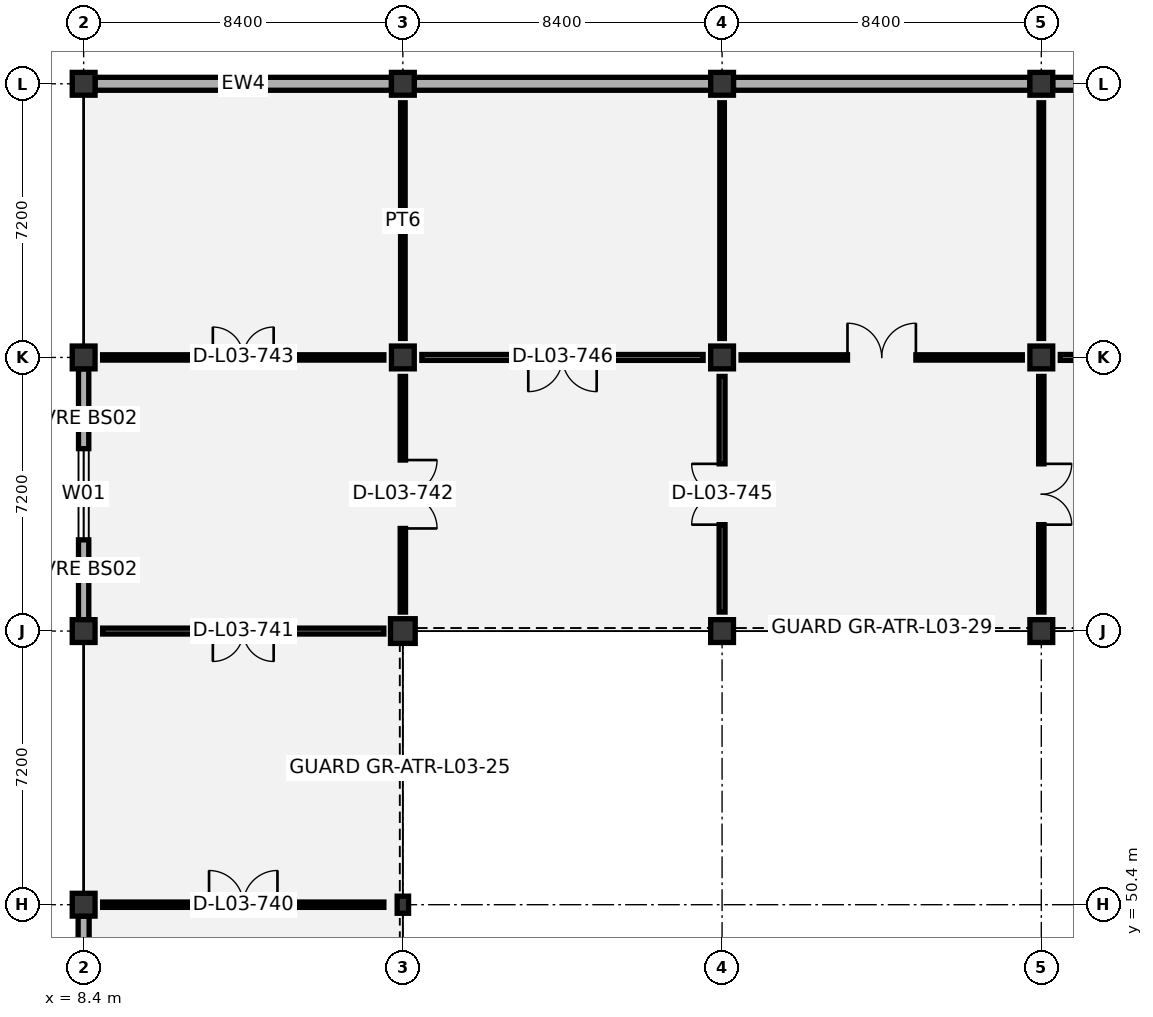
"""IFC4 building model, lengths in metres.
Left out: names, types, materials, properties, quantities, classifications, styles, units other than length and angle.
Written with IfcOpenShell. Run it as: python <this file> out.ifc"""

import sys

from ifc_helpers import new_model, si_unit, direction, frame, frame_2d, origin, origin_2d, place, context, subcontext, project, spatial, rectangle, i_section, extrude, element, fill, save


model = new_model("IFC4")
c1 = context("Model", 3, precision=1e-05, world=origin(), true_north=direction((0.0, 1.0)))
c2 = subcontext(c1, "Body", "Model", "MODEL_VIEW")
j1 = project(units=[si_unit("LENGTHUNIT", "METRE"), si_unit("PLANEANGLEUNIT", "RADIAN")], contexts=[c1])
p1 = place(None, origin())
s1 = spatial("IfcSite", under=j1, at=p1, CompositionType="ELEMENT")
p2 = place(p1, origin())
s2 = spatial("IfcBuilding", under=s1, at=p2, CompositionType="ELEMENT")
p3 = place(p2, frame((0.0, 0.0, 16.8)))
s3 = spatial("IfcBuildingStorey", under=s2, at=p3, CompositionType="ELEMENT", Elevation=16.8)
for number, where, z_axis, x_axis in (
    (1, (8.4, 50.4, 0.0), (0.0, 0.0, 1.0), (1.0, 0.0, 0.0)),
    (2, (8.4, 57.6, 0.0), (0.0, 0.0, 1.0), (1.0, 0.0, 0.0)),
    (3, (8.4, 64.8, 0.0), (0.0, 0.0, 1.0), (1.0, 0.0, 0.0)),
    (4, (8.4, 72.0, 0.0), (0.0, 0.0, 1.0), (1.0, 0.0, 0.0)),
):
    element("IfcColumn", number, at=place(p3, frame(where, z_axis=z_axis, x_axis=x_axis)), inside=s3, PredefinedType="COLUMN", context=c2, shape_type="SweptSolid", body=[
        extrude(rectangle(XDim=0.6, YDim=0.6, at=origin_2d()), origin(), (0.0, 0.0, 1.0), 5.05),
    ])
p4 = place(p3, frame((16.8, 50.4, 0.0), z_axis=(0.0, 0.0, 1.0), x_axis=(1.0, 0.0, 0.0)))
e5 = element("IfcColumn", 5, at=p4, inside=s3, PredefinedType="COLUMN", context=c2, shape_type="SweptSolid", body=[
    extrude(i_section(OverallWidth=0.3, OverallDepth=0.45, WebThickness=0.014, FlangeThickness=0.026, FilletRadius=0.027, at=origin_2d()), origin(), (0.0, 0.0, 1.0), 5.4),
])
p5 = place(p3, frame((16.8, 57.6, 0.0), z_axis=(0.0, 0.0, 1.0), x_axis=(1.0, 0.0, 0.0)))
e6 = element("IfcColumn", 6, at=p5, inside=s3, PredefinedType="COLUMN", context=c2, shape_type="SweptSolid", body=[
    extrude(rectangle(XDim=0.65, YDim=0.65, at=origin_2d()), origin(), (0.0, 0.0, 1.0), 5.4),
])
for number, where, z_axis, x_axis in (
    (7, (16.8, 64.8, 0.0), (0.0, 0.0, 1.0), (1.0, 0.0, 0.0)),
    (8, (16.8, 72.0, 0.0), (0.0, 0.0, 1.0), (1.0, 0.0, 0.0)),
    (9, (25.2, 57.6, 0.0), (0.0, 0.0, 1.0), (1.0, 0.0, 0.0)),
    (10, (25.2, 64.8, 0.0), (0.0, 0.0, 1.0), (1.0, 0.0, 0.0)),
    (11, (25.2, 72.0, 0.0), (0.0, 0.0, 1.0), (1.0, 0.0, 0.0)),
    (12, (33.6, 57.6, 0.0), (0.0, 0.0, 1.0), (1.0, 0.0, 0.0)),
    (13, (33.6, 64.8, 0.0), (0.0, 0.0, 1.0), (1.0, 0.0, 0.0)),
    (14, (33.6, 72.0, 0.0), (0.0, 0.0, 1.0), (1.0, 0.0, 0.0)),
):
    element("IfcColumn", number, at=place(p3, frame(where, z_axis=z_axis, x_axis=x_axis)), inside=s3, PredefinedType="COLUMN", context=c2, shape_type="SweptSolid", body=[
        extrude(rectangle(XDim=0.6, YDim=0.6, at=origin_2d()), origin(), (0.0, 0.0, 1.0), 5.05),
    ])
p6 = place(p3, frame((8.4, 43.5, 0.0), z_axis=(0.0, 0.0, 1.0), x_axis=(0.0, 1.0, 0.0)))
e15 = element("IfcWall", 15, at=p6, inside=s3, PredefinedType="SOLIDWALL", context=c2, shape_type="SweptSolid", body=[
    extrude(rectangle(XDim=6.6, YDim=0.29, at=frame_2d((3.3, 0.0))), origin(), (0.0, 0.0, 1.0), 4.17),
])
p7 = place(p6, frame((2.175, 0.0, 0.9)))
e16 = element("IfcOpeningElement", 16, at=p7, cuts=e15, PredefinedType="OPENING", context=c2, shape_type="SweptSolid", body=[
    extrude(rectangle(XDim=2.25, YDim=1.95, at=frame_2d((1.125, 0.975))), frame((0.0, 0.155, 0.0), z_axis=(0.0, -1.0, 0.0), x_axis=(1.0, 0.0, 0.0)), (0.0, 0.0, 1.0), 0.31),
])
p8 = place(p3, frame((8.4, 57.9, 0.0), z_axis=(0.0, 0.0, 1.0), x_axis=(0.0, 1.0, 0.0)))
e17 = element("IfcWall", 17, at=p8, inside=s3, PredefinedType="SOLIDWALL", context=c2, shape_type="SweptSolid", body=[
    extrude(rectangle(XDim=6.6, YDim=0.27, at=frame_2d((3.3, 0.0))), origin(), (0.0, 0.0, 1.0), 4.17),
])
p9 = place(p8, frame((2.1, 0.0, 0.9)))
e18 = element("IfcOpeningElement", 18, at=p9, cuts=e17, PredefinedType="OPENING", context=c2, shape_type="SweptSolid", body=[
    extrude(rectangle(XDim=2.4, YDim=1.8, at=frame_2d((1.2, 0.9))), frame((0.0, 0.145, 0.0), z_axis=(0.0, -1.0, 0.0), x_axis=(1.0, 0.0, 0.0)), (0.0, 0.0, 1.0), 0.29),
])
p10 = place(p3, frame((8.7, 72.0, 0.0), z_axis=(0.0, 0.0, 1.0), x_axis=(1.0, 0.0, 0.0)))
e19 = element("IfcWall", 19, at=p10, inside=s3, PredefinedType="SOLIDWALL", context=c2, shape_type="SweptSolid", body=[
    extrude(rectangle(XDim=7.8, YDim=0.34, at=frame_2d((3.9, 0.0))), origin(), (0.0, 0.0, 1.0), 4.17),
])
p11 = place(p3, frame((17.1, 72.0, 0.0), z_axis=(0.0, 0.0, 1.0), x_axis=(1.0, 0.0, 0.0)))
e20 = element("IfcWall", 20, at=p11, inside=s3, PredefinedType="SOLIDWALL", context=c2, shape_type="SweptSolid", body=[
    extrude(rectangle(XDim=7.8, YDim=0.34, at=frame_2d((3.9, 0.0))), origin(), (0.0, 0.0, 1.0), 4.17),
])
for number, where, z_axis, x_axis in (
    (21, (25.5, 72.0, 0.0), (0.0, 0.0, 1.0), (1.0, 0.0, 0.0)),
    (22, (33.9, 72.0, 0.0), (0.0, 0.0, 1.0), (1.0, 0.0, 0.0)),
):
    element("IfcWall", number, at=place(p3, frame(where, z_axis=z_axis, x_axis=x_axis)), inside=s3, PredefinedType="SOLIDWALL", context=c2, shape_type="SweptSolid", body=[
        extrude(rectangle(XDim=7.8, YDim=0.34, at=frame_2d((3.9, 0.0))), origin(), (0.0, 0.0, 1.0), 4.17),
    ])
p12 = place(p3, frame((8.9, 50.4, 0.0), z_axis=(0.0, 0.0, 1.0), x_axis=(1.0, 0.0, 0.0)))
e23 = element("IfcWall", 23, at=p12, inside=s3, PredefinedType="PARTITIONING", context=c2, shape_type="SweptSolid", body=[
    extrude(rectangle(XDim=7.4, YDim=0.14, at=frame_2d((3.7, 0.0))), origin(), (0.0, 0.0, 1.0), 4.07),
])
p13 = place(p12, frame((2.8, 0.0, 0.0)))
e24 = element("IfcOpeningElement", 24, at=p13, cuts=e23, PredefinedType="OPENING", context=c2, shape_type="SweptSolid", body=[
    extrude(rectangle(XDim=1.8, YDim=2.25, at=frame_2d((0.9, 1.125))), frame((0.0, 0.08, 0.0), z_axis=(0.0, -1.0, 0.0), x_axis=(1.0, 0.0, 0.0)), (0.0, 0.0, 1.0), 0.16),
])
p14 = place(p3, frame((8.9, 57.6, 0.0), z_axis=(0.0, 0.0, 1.0), x_axis=(1.0, 0.0, 0.0)))
e25 = element("IfcWall", 25, at=p14, inside=s3, PredefinedType="PARTITIONING", context=c2, shape_type="SweptSolid", body=[
    extrude(rectangle(XDim=7.4, YDim=0.155, at=frame_2d((3.7, 0.0))), origin(), (0.0, 0.0, 1.0), 4.07),
])
p15 = place(p14, frame((2.9, 0.0, 0.0)))
e26 = element("IfcOpeningElement", 26, at=p15, cuts=e25, PredefinedType="OPENING", context=c2, shape_type="SweptSolid", body=[
    extrude(rectangle(XDim=1.6, YDim=2.2, at=frame_2d((0.8, 1.1))), frame((0.0, 0.087, 0.0), z_axis=(0.0, -1.0, 0.0), x_axis=(1.0, 0.0, 0.0)), (0.0, 0.0, 1.0), 0.175),
])
p16 = place(p3, frame((16.8, 58.1, 0.0), z_axis=(0.0, 0.0, 1.0), x_axis=(0.0, 1.0, 0.0)))
e27 = element("IfcWall", 27, at=p16, inside=s3, PredefinedType="PARTITIONING", context=c2, shape_type="SweptSolid", body=[
    extrude(rectangle(XDim=6.2, YDim=0.14, at=frame_2d((3.1, 0.0))), origin(), (0.0, 0.0, 1.0), 4.12),
])
p17 = place(p16, frame((2.2, 0.0, 0.0)))
e28 = element("IfcOpeningElement", 28, at=p17, cuts=e27, PredefinedType="OPENING", context=c2, shape_type="SweptSolid", body=[
    extrude(rectangle(XDim=1.8, YDim=2.25, at=frame_2d((0.9, 1.125))), frame((0.0, 0.08, 0.0), z_axis=(0.0, -1.0, 0.0), x_axis=(1.0, 0.0, 0.0)), (0.0, 0.0, 1.0), 0.16),
])
p18 = place(p3, frame((8.9, 64.8, 0.0), z_axis=(0.0, 0.0, 1.0), x_axis=(1.0, 0.0, 0.0)))
e29 = element("IfcWall", 29, at=p18, inside=s3, PredefinedType="PARTITIONING", context=c2, shape_type="SweptSolid", body=[
    extrude(rectangle(XDim=7.4, YDim=0.14, at=frame_2d((3.7, 0.0))), origin(), (0.0, 0.0, 1.0), 4.07),
])
p19 = place(p18, frame((2.9, 0.0, 0.0)))
e30 = element("IfcOpeningElement", 30, at=p19, cuts=e29, PredefinedType="OPENING", context=c2, shape_type="SweptSolid", body=[
    extrude(rectangle(XDim=1.6, YDim=2.2, at=frame_2d((0.8, 1.1))), frame((0.0, 0.08, 0.0), z_axis=(0.0, -1.0, 0.0), x_axis=(1.0, 0.0, 0.0)), (0.0, 0.0, 1.0), 0.16),
])
p20 = place(p3, frame((16.8, 65.3, 0.0), z_axis=(0.0, 0.0, 1.0), x_axis=(0.0, 1.0, 0.0)))
e31 = element("IfcWall", 31, at=p20, inside=s3, PredefinedType="PARTITIONING", context=c2, shape_type="SweptSolid", body=[
    extrude(rectangle(XDim=6.2, YDim=0.12, at=frame_2d((3.1, 0.0))), origin(), (0.0, 0.0, 1.0), 4.53),
])
p21 = place(p3, frame((25.2, 58.1, 0.0), z_axis=(0.0, 0.0, 1.0), x_axis=(0.0, 1.0, 0.0)))
e32 = element("IfcWall", 32, at=p21, inside=s3, PredefinedType="PARTITIONING", context=c2, shape_type="SweptSolid", body=[
    extrude(rectangle(XDim=6.2, YDim=0.155, at=frame_2d((3.1, 0.0))), origin(), (0.0, 0.0, 1.0), 4.53),
])
p22 = place(p21, frame((2.3, 0.0, 0.0)))
e33 = element("IfcOpeningElement", 33, at=p22, cuts=e32, PredefinedType="OPENING", context=c2, shape_type="SweptSolid", body=[
    extrude(rectangle(XDim=1.6, YDim=2.2, at=frame_2d((0.8, 1.1))), frame((0.0, 0.087, 0.0), z_axis=(0.0, -1.0, 0.0), x_axis=(1.0, 0.0, 0.0)), (0.0, 0.0, 1.0), 0.175),
])
p23 = place(p3, frame((17.3, 64.8, 0.0), z_axis=(0.0, 0.0, 1.0), x_axis=(1.0, 0.0, 0.0)))
e34 = element("IfcWall", 34, at=p23, inside=s3, PredefinedType="PARTITIONING", context=c2, shape_type="SweptSolid", body=[
    extrude(rectangle(XDim=7.4, YDim=0.155, at=frame_2d((3.7, 0.0))), origin(), (0.0, 0.0, 1.0), 4.07),
])
p24 = place(p23, frame((2.8, 0.0, 0.0)))
e35 = element("IfcOpeningElement", 35, at=p24, cuts=e34, PredefinedType="OPENING", context=c2, shape_type="SweptSolid", body=[
    extrude(rectangle(XDim=1.8, YDim=2.25, at=frame_2d((0.9, 1.125))), frame((0.0, 0.087, 0.0), z_axis=(0.0, -1.0, 0.0), x_axis=(1.0, 0.0, 0.0)), (0.0, 0.0, 1.0), 0.175),
])
p25 = place(p3, frame((25.2, 65.3, 0.0), z_axis=(0.0, 0.0, 1.0), x_axis=(0.0, 1.0, 0.0)))
e36 = element("IfcWall", 36, at=p25, inside=s3, PredefinedType="PARTITIONING", context=c2, shape_type="SweptSolid", body=[
    extrude(rectangle(XDim=6.2, YDim=0.12, at=frame_2d((3.1, 0.0))), origin(), (0.0, 0.0, 1.0), 4.12),
])
p26 = place(p3, frame((33.6, 58.1, 0.0), z_axis=(0.0, 0.0, 1.0), x_axis=(0.0, 1.0, 0.0)))
e37 = element("IfcWall", 37, at=p26, inside=s3, PredefinedType="PARTITIONING", context=c2, shape_type="SweptSolid", body=[
    extrude(rectangle(XDim=6.2, YDim=0.14, at=frame_2d((3.1, 0.0))), origin(), (0.0, 0.0, 1.0), 4.12),
])
p27 = place(p26, frame((2.3, 0.0, 0.0)))
e38 = element("IfcOpeningElement", 38, at=p27, cuts=e37, PredefinedType="OPENING", context=c2, shape_type="SweptSolid", body=[
    extrude(rectangle(XDim=1.6, YDim=2.2, at=frame_2d((0.8, 1.1))), frame((0.0, 0.08, 0.0), z_axis=(0.0, -1.0, 0.0), x_axis=(1.0, 0.0, 0.0)), (0.0, 0.0, 1.0), 0.16),
])
p28 = place(p3, frame((25.7, 64.8, 0.0), z_axis=(0.0, 0.0, 1.0), x_axis=(1.0, 0.0, 0.0)))
e39 = element("IfcWall", 39, at=p28, inside=s3, PredefinedType="PARTITIONING", context=c2, shape_type="SweptSolid", body=[
    extrude(rectangle(XDim=7.4, YDim=0.14, at=frame_2d((3.7, 0.0))), origin(), (0.0, 0.0, 1.0), 4.07),
])
p29 = place(p28, frame((2.8, 0.0, 0.0)))
e40 = element("IfcOpeningElement", 40, at=p29, cuts=e39, PredefinedType="OPENING", context=c2, shape_type="SweptSolid", body=[
    extrude(rectangle(XDim=1.8, YDim=2.25, at=frame_2d((0.9, 1.125))), frame((0.0, 0.08, 0.0), z_axis=(0.0, -1.0, 0.0), x_axis=(1.0, 0.0, 0.0)), (0.0, 0.0, 1.0), 0.16),
])
p30 = place(p3, frame((33.6, 65.3, 0.0), z_axis=(0.0, 0.0, 1.0), x_axis=(0.0, 1.0, 0.0)))
e41 = element("IfcWall", 41, at=p30, inside=s3, PredefinedType="PARTITIONING", context=c2, shape_type="SweptSolid", body=[
    extrude(rectangle(XDim=6.2, YDim=0.12, at=frame_2d((3.1, 0.0))), origin(), (0.0, 0.0, 1.0), 4.32),
])
p31 = place(p3, frame((34.1, 64.8, 0.0), z_axis=(0.0, 0.0, 1.0), x_axis=(1.0, 0.0, 0.0)))
e42 = element("IfcWall", 42, at=p31, inside=s3, PredefinedType="PARTITIONING", context=c2, shape_type="SweptSolid", body=[
    extrude(rectangle(XDim=7.4, YDim=0.155, at=frame_2d((3.7, 0.0))), origin(), (0.0, 0.0, 1.0), 4.07),
])
p32 = place(p31, frame((2.9, 0.0, 0.0)))
e43 = element("IfcOpeningElement", 43, at=p32, cuts=e42, PredefinedType="OPENING", context=c2, shape_type="SweptSolid", body=[
    extrude(rectangle(XDim=1.6, YDim=2.2, at=frame_2d((0.8, 1.1))), frame((0.0, 0.087, 0.0), z_axis=(0.0, -1.0, 0.0), x_axis=(1.0, 0.0, 0.0)), (0.0, 0.0, 1.0), 0.175),
])
p33 = place(p9, origin())
e44 = element("IfcWindow", 44, at=p33, inside=s3, PartitioningType="SINGLE_PANEL", PredefinedType="WINDOW", context=c2, shape_type="SweptSolid", body=[
    extrude(rectangle(XDim=2.4, YDim=1.8, at=frame_2d((1.2, 0.9))), frame((0.0, 0.03, 0.0), z_axis=(0.0, -1.0, 0.0), x_axis=(1.0, 0.0, 0.0)), (0.0, 0.0, 1.0), 0.06),
])
fill(e18, e44)
p34 = place(p13, origin())
e45 = element("IfcDoor", 45, at=p34, inside=s3, OperationType="DOUBLE_DOOR_SINGLE_SWING", PredefinedType="DOOR", context=c2, shape_type="SweptSolid", body=[
    extrude(rectangle(XDim=1.8, YDim=2.25, at=frame_2d((0.9, 1.125))), frame((0.0, 0.025, 0.0), z_axis=(0.0, -1.0, 0.0), x_axis=(1.0, 0.0, 0.0)), (0.0, 0.0, 1.0), 0.05),
])
fill(e24, e45)
p35 = place(p15, frame((1.6, 0.0, 0.0), z_axis=(0.0, 0.0, 1.0), x_axis=(-1.0, 0.0, 0.0)))
e46 = element("IfcDoor", 46, at=p35, inside=s3, OperationType="DOUBLE_DOOR_SINGLE_SWING", PredefinedType="DOOR", context=c2, shape_type="SweptSolid", body=[
    extrude(rectangle(XDim=1.6, YDim=2.2, at=frame_2d((0.8, 1.1))), frame((0.0, 0.025, 0.0), z_axis=(0.0, -1.0, 0.0), x_axis=(1.0, 0.0, 0.0)), (0.0, 0.0, 1.0), 0.05),
])
fill(e26, e46)
p36 = place(p17, frame((1.8, 0.0, 0.0), z_axis=(0.0, 0.0, 1.0), x_axis=(-1.0, 0.0, 0.0)))
e47 = element("IfcDoor", 47, at=p36, inside=s3, OperationType="DOUBLE_DOOR_SINGLE_SWING", PredefinedType="DOOR", context=c2, shape_type="SweptSolid", body=[
    extrude(rectangle(XDim=1.8, YDim=2.25, at=frame_2d((0.9, 1.125))), frame((0.0, 0.025, 0.0), z_axis=(0.0, -1.0, 0.0), x_axis=(1.0, 0.0, 0.0)), (0.0, 0.0, 1.0), 0.05),
])
fill(e28, e47)
p37 = place(p19, origin())
e48 = element("IfcDoor", 48, at=p37, inside=s3, OperationType="DOUBLE_DOOR_SINGLE_SWING", PredefinedType="DOOR", context=c2, shape_type="SweptSolid", body=[
    extrude(rectangle(XDim=1.6, YDim=2.2, at=frame_2d((0.8, 1.1))), frame((0.0, 0.025, 0.0), z_axis=(0.0, -1.0, 0.0), x_axis=(1.0, 0.0, 0.0)), (0.0, 0.0, 1.0), 0.05),
])
fill(e30, e48)
p38 = place(p22, origin())
e49 = element("IfcDoor", 49, at=p38, inside=s3, OperationType="DOUBLE_DOOR_SINGLE_SWING", PredefinedType="DOOR", context=c2, shape_type="SweptSolid", body=[
    extrude(rectangle(XDim=1.6, YDim=2.2, at=frame_2d((0.8, 1.1))), frame((0.0, 0.025, 0.0), z_axis=(0.0, -1.0, 0.0), x_axis=(1.0, 0.0, 0.0)), (0.0, 0.0, 1.0), 0.05),
])
fill(e33, e49)
p39 = place(p24, frame((1.8, 0.0, 0.0), z_axis=(0.0, 0.0, 1.0), x_axis=(-1.0, 0.0, 0.0)))
e50 = element("IfcDoor", 50, at=p39, inside=s3, OperationType="DOUBLE_DOOR_SINGLE_SWING", PredefinedType="DOOR", context=c2, shape_type="SweptSolid", body=[
    extrude(rectangle(XDim=1.8, YDim=2.25, at=frame_2d((0.9, 1.125))), frame((0.0, 0.025, 0.0), z_axis=(0.0, -1.0, 0.0), x_axis=(1.0, 0.0, 0.0)), (0.0, 0.0, 1.0), 0.05),
])
fill(e35, e50)
p40 = place(p27, frame((1.6, 0.0, 0.0), z_axis=(0.0, 0.0, 1.0), x_axis=(-1.0, 0.0, 0.0)))
e51 = element("IfcDoor", 51, at=p40, inside=s3, OperationType="DOUBLE_DOOR_SINGLE_SWING", PredefinedType="DOOR", context=c2, shape_type="SweptSolid", body=[
    extrude(rectangle(XDim=1.6, YDim=2.2, at=frame_2d((0.8, 1.1))), frame((0.0, 0.025, 0.0), z_axis=(0.0, -1.0, 0.0), x_axis=(1.0, 0.0, 0.0)), (0.0, 0.0, 1.0), 0.05),
])
fill(e38, e51)
p41 = place(p29, origin())
e52 = element("IfcDoor", 52, at=p41, inside=s3, OperationType="DOUBLE_DOOR_SINGLE_SWING", PredefinedType="DOOR", context=c2, shape_type="SweptSolid", body=[
    extrude(rectangle(XDim=1.8, YDim=2.25, at=frame_2d((0.9, 1.125))), frame((0.0, 0.025, 0.0), z_axis=(0.0, -1.0, 0.0), x_axis=(1.0, 0.0, 0.0)), (0.0, 0.0, 1.0), 0.05),
])
fill(e40, e52)
save(model, sys.argv[1])
